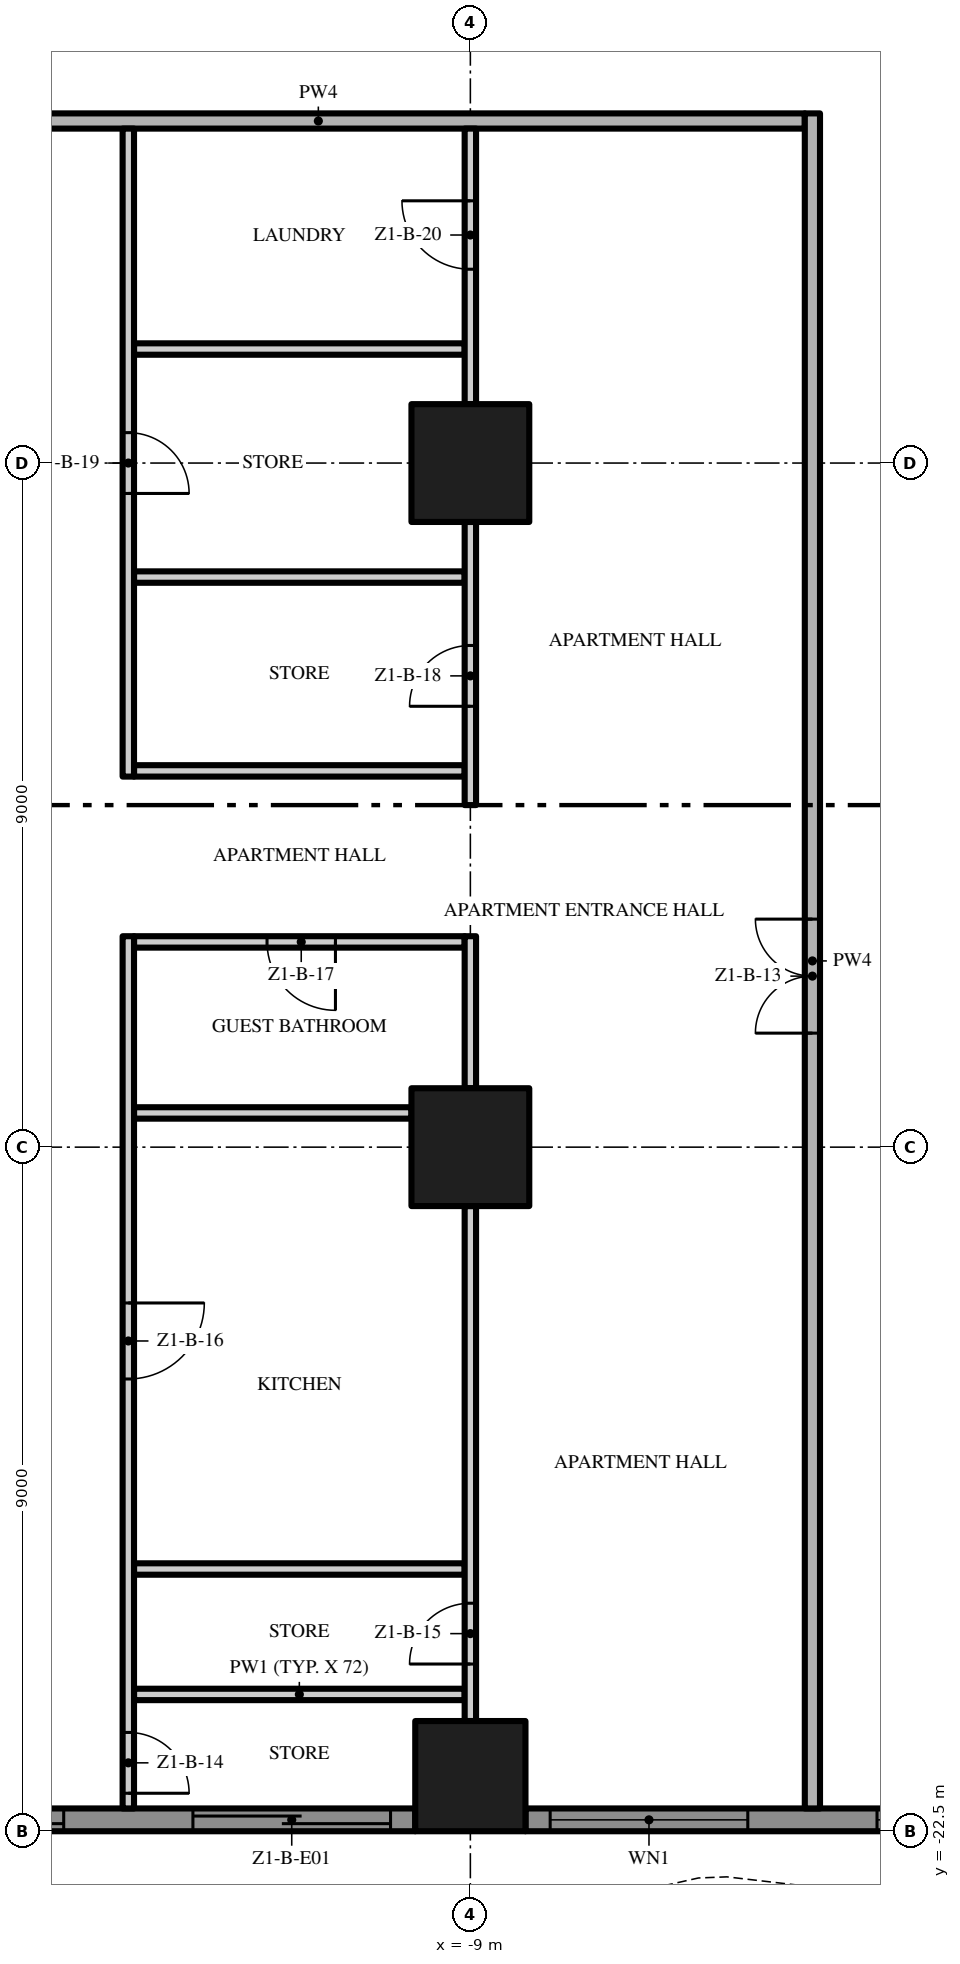
"""IFC4 building model, lengths in metres.
Left out: names, types, materials, properties, quantities, classifications, styles, units other than length and angle.
Written with IfcOpenShell. Run it as: python <this file> out.ifc"""

import sys

from ifc_helpers import new_model, si_unit, direction, frame, frame_2d, origin, origin_2d, place, context, subcontext, project, spatial, polyline, rectangle, outline, extrude, element, fill, save


model = new_model("IFC4")
c1 = context("Model", 3, precision=1e-05, world=origin(), true_north=direction((0.0, 1.0)))
c2 = subcontext(c1, "Body", "Model", "MODEL_VIEW")
j1 = project(units=[si_unit("LENGTHUNIT", "METRE"), si_unit("PLANEANGLEUNIT", "RADIAN")], contexts=[c1])
p1 = place(None, origin())
s1 = spatial("IfcSite", under=j1, at=p1, CompositionType="ELEMENT")
p2 = place(p1, origin())
s2 = spatial("IfcBuilding", under=s1, at=p2, CompositionType="ELEMENT")
p3 = place(p2, frame((0.0, 0.0, 34.0)))
s3 = spatial("IfcBuildingStorey", under=s2, at=p3, CompositionType="ELEMENT", Elevation=34.0)
p4 = place(p3, frame((-9.0, -13.5, 0.0), z_axis=(0.0, 0.0, 1.0), x_axis=(1.0, 0.0, 0.0)))
e1 = element("IfcColumn", 1, at=p4, inside=s3, PredefinedType="COLUMN", context=c2, shape_type="SweptSolid", body=[
    extrude(rectangle(XDim=1.55, YDim=1.55, at=origin_2d()), origin(), (0.0, 0.0, 1.0), 3.5),
])
p5 = place(p3, frame((-9.0, -21.775, 0.0), z_axis=(0.0, 0.0, 1.0), x_axis=(1.0, 0.0, 0.0)))
e2 = element("IfcColumn", 2, at=p5, inside=s3, PredefinedType="COLUMN", context=c2, shape_type="SweptSolid", body=[
    extrude(rectangle(XDim=1.45, YDim=1.45, at=origin_2d()), origin(), (0.0, 0.0, 1.0), 3.5),
])
p6 = place(p3, frame((-9.0, -4.5, 0.0), z_axis=(0.0, 0.0, 1.0), x_axis=(1.0, 0.0, 0.0)))
e3 = element("IfcColumn", 3, at=p6, inside=s3, PredefinedType="COLUMN", context=c2, shape_type="SweptSolid", body=[
    extrude(rectangle(XDim=1.55, YDim=1.55, at=origin_2d()), origin(), (0.0, 0.0, 1.0), 3.5),
])
p7 = place(p3, frame((-9.725, -22.35, 0.0), z_axis=(0.0, 0.0, 1.0), x_axis=(-1.0, 0.0, 0.0)))
e4 = element("IfcWall", 4, at=p7, inside=s3, PredefinedType="SOLIDWALL", context=c2, shape_type="SweptSolid", body=[
    extrude(rectangle(XDim=7.55, YDim=0.3, at=frame_2d((3.775, 0.0))), origin(), (0.0, 0.0, 1.0), 3.5),
])
p8 = place(p7, frame((4.625, 0.0, 0.0)))
e5 = element("IfcOpeningElement", 5, at=p8, cuts=e4, PredefinedType="OPENING", context=c2, shape_type="SweptSolid", body=[
    extrude(rectangle(XDim=2.6, YDim=2.4, at=frame_2d((1.3, 1.2))), frame((0.0, 0.16, 0.0), z_axis=(0.0, -1.0, 0.0), x_axis=(1.0, 0.0, 0.0)), (0.0, 0.0, 1.0), 0.32),
])
p9 = place(p7, frame((0.325, 0.0, 0.0)))
e6 = element("IfcOpeningElement", 6, at=p9, cuts=e4, PredefinedType="OPENING", context=c2, shape_type="SweptSolid", body=[
    extrude(rectangle(XDim=2.6, YDim=2.4, at=frame_2d((1.3, 1.2))), frame((0.0, 0.16, 0.0), z_axis=(0.0, -1.0, 0.0), x_axis=(1.0, 0.0, 0.0)), (0.0, 0.0, 1.0), 0.32),
])
p10 = place(p3, frame((-0.725, -22.35, 0.0), z_axis=(0.0, 0.0, 1.0), x_axis=(-1.0, 0.0, 0.0)))
e7 = element("IfcWall", 7, at=p10, inside=s3, PredefinedType="SOLIDWALL", context=c2, shape_type="SweptSolid", body=[
    extrude(rectangle(XDim=7.55, YDim=0.3, at=frame_2d((3.775, 0.0))), origin(), (0.0, 0.0, 1.0), 3.5),
])
p11 = place(p10, frame((4.625, 0.0, 0.45)))
e8 = element("IfcOpeningElement", 8, at=p11, cuts=e7, PredefinedType="OPENING", context=c2, shape_type="SweptSolid", body=[
    extrude(rectangle(XDim=2.6, YDim=2.65, at=frame_2d((1.3, 1.325))), frame((0.0, 0.16, 0.0), z_axis=(0.0, -1.0, 0.0), x_axis=(1.0, 0.0, 0.0)), (0.0, 0.0, 1.0), 0.32),
])
p12 = place(p10, frame((0.325, 0.0, 0.45)))
e9 = element("IfcOpeningElement", 9, at=p12, cuts=e7, PredefinedType="OPENING", context=c2, shape_type="SweptSolid", body=[
    extrude(rectangle(XDim=2.6, YDim=2.65, at=frame_2d((1.3, 1.325))), frame((0.0, 0.16, 0.0), z_axis=(0.0, -1.0, 0.0), x_axis=(1.0, 0.0, 0.0)), (0.0, 0.0, 1.0), 0.32),
])
p13 = place(p3, origin())
e10 = element("IfcWall", 10, at=p13, inside=s3, PredefinedType="USERDEFINED", context=c2, shape_type="SweptSolid", body=[
    extrude(outline(polyline([(-22.5, -23.451), (-21.0, -23.115), (-20.625, -23.1), (-19.5, -23.231), (-18.0, -23.755), (-16.5, -24.488), (-15.0, -25.149), (-13.5, -25.485), (-13.125, -25.5), (-12.0, -25.369), (-10.5, -24.845), (-9.0, -24.112), (-7.5, -23.451), (-6.0, -23.115), (-5.625, -23.1), (-4.5, -23.231), (-3.0, -23.755), (-1.5, -24.488), (0.0, -25.149), (1.5, -25.485), (1.875, -25.5), (3.0, -25.369), (4.5, -24.845), (6.0, -24.112), (7.5, -23.451), (9.0, -23.115), (9.375, -23.1), (10.5, -23.231), (12.0, -23.755), (13.5, -24.488), (15.0, -25.149), (16.5, -25.485), (16.875, -25.5), (18.0, -25.369), (19.5, -24.845), (21.0, -24.112), (22.5, -23.451), (22.399, -23.223), (20.895, -23.885), (19.404, -24.614), (17.944, -25.124), (16.865, -25.249), (16.533, -25.236), (15.079, -24.91), (13.605, -24.261), (12.096, -23.524), (10.556, -22.986), (9.385, -22.849), (8.967, -22.866), (7.421, -23.213), (5.895, -23.885), (4.404, -24.614), (2.944, -25.124), (1.865, -25.249), (1.533, -25.236), (0.079, -24.91), (-1.395, -24.261), (-2.904, -23.524), (-4.444, -22.986), (-5.615, -22.849), (-6.033, -22.866), (-7.579, -23.213), (-9.105, -23.885), (-10.596, -24.614), (-12.056, -25.124), (-13.135, -25.249), (-13.467, -25.236), (-14.921, -24.91), (-16.395, -24.261), (-17.904, -23.524), (-19.444, -22.986), (-20.615, -22.849), (-21.033, -22.866), (-22.555, -23.208), (-22.5, -23.451)])), origin(), (0.0, 0.0, 1.0), 0.9),
])
for number, where, z_axis, x_axis in (
    (11, (-13.425, -20.7, 0.0), (0.0, 0.0, 1.0), (1.0, 0.0, 0.0)),
    (12, (-13.425, -19.05, 0.0), (0.0, 0.0, 1.0), (1.0, 0.0, 0.0)),
):
    element("IfcWall", number, at=place(p3, frame(where, z_axis=z_axis, x_axis=x_axis)), inside=s3, PredefinedType="PARTITIONING", context=c2, shape_type="SweptSolid", body=[
        extrude(rectangle(XDim=4.35, YDim=0.15, at=frame_2d((2.175, 0.0))), origin(), (0.0, 0.0, 1.0), 3.5),
    ])
p14 = place(p3, frame((-13.425, -13.05, 0.0), z_axis=(0.0, 0.0, 1.0), x_axis=(1.0, 0.0, 0.0)))
e13 = element("IfcWall", 13, at=p14, inside=s3, PredefinedType="PARTITIONING", context=c2, shape_type="SweptSolid", body=[
    extrude(rectangle(XDim=3.65, YDim=0.15, at=frame_2d((1.825, 0.0))), origin(), (0.0, 0.0, 1.0), 3.5),
])
p15 = place(p3, frame((-9.075, -10.8, 0.0), z_axis=(0.0, 0.0, 1.0), x_axis=(-1.0, 0.0, 0.0)))
e14 = element("IfcWall", 14, at=p15, inside=s3, PredefinedType="PARTITIONING", context=c2, shape_type="SweptSolid", body=[
    extrude(rectangle(XDim=4.35, YDim=0.15, at=frame_2d((2.175, 0.0))), origin(), (0.0, 0.0, 1.0), 3.5),
])
p16 = place(p15, frame((1.7, 0.0, 0.0)))
e15 = element("IfcOpeningElement", 15, at=p16, cuts=e14, PredefinedType="OPENING", context=c2, shape_type="SweptSolid", body=[
    extrude(rectangle(XDim=0.9, YDim=2.1, at=frame_2d((0.45, 1.05))), frame((0.0, 0.085, 0.0), z_axis=(0.0, -1.0, 0.0), x_axis=(1.0, 0.0, 0.0)), (0.0, 0.0, 1.0), 0.17),
])
for number, where, z_axis, x_axis in (
    (16, (-13.425, -8.55, 0.0), (0.0, 0.0, 1.0), (1.0, 0.0, 0.0)),
    (17, (-13.425, -6.0, 0.0), (0.0, 0.0, 1.0), (1.0, 0.0, 0.0)),
    (18, (-13.425, -3.0, 0.0), (0.0, 0.0, 1.0), (1.0, 0.0, 0.0)),
):
    element("IfcWall", number, at=place(p3, frame(where, z_axis=z_axis, x_axis=x_axis)), inside=s3, PredefinedType="PARTITIONING", context=c2, shape_type="SweptSolid", body=[
        extrude(rectangle(XDim=4.35, YDim=0.15, at=frame_2d((2.175, 0.0))), origin(), (0.0, 0.0, 1.0), 3.5),
    ])
p17 = place(p3, frame((-17.4, 0.0, 0.0), z_axis=(0.0, 0.0, 1.0), x_axis=(1.0, 0.0, 0.0)))
e19 = element("IfcWall", 19, at=p17, inside=s3, PredefinedType="PARTITIONING", context=c2, shape_type="SweptSolid", body=[
    extrude(rectangle(XDim=12.8, YDim=0.2, at=frame_2d((6.4, 0.0))), origin(), (0.0, 0.0, 1.0), 3.5),
])
p18 = place(p3, frame((-13.5, -10.725, 0.0), z_axis=(0.0, 0.0, 1.0), x_axis=(0.0, -1.0, 0.0)))
e20 = element("IfcWall", 20, at=p18, inside=s3, PredefinedType="PARTITIONING", context=c2, shape_type="SweptSolid", body=[
    extrude(rectangle(XDim=11.475, YDim=0.15, at=frame_2d((5.737, 0.0))), origin(), (0.0, 0.0, 1.0), 3.5),
])
p19 = place(p18, frame((10.475, 0.0, 0.0)))
e21 = element("IfcOpeningElement", 21, at=p19, cuts=e20, PredefinedType="OPENING", context=c2, shape_type="SweptSolid", body=[
    extrude(rectangle(XDim=0.8, YDim=2.0, at=frame_2d((0.4, 1.0))), frame((0.0, 0.085, 0.0), z_axis=(0.0, -1.0, 0.0), x_axis=(1.0, 0.0, 0.0)), (0.0, 0.0, 1.0), 0.17),
])
p20 = place(p18, frame((4.825, 0.0, 0.0)))
e22 = element("IfcOpeningElement", 22, at=p20, cuts=e20, PredefinedType="OPENING", context=c2, shape_type="SweptSolid", body=[
    extrude(rectangle(XDim=1.0, YDim=2.4, at=frame_2d((0.5, 1.2))), frame((0.0, 0.085, 0.0), z_axis=(0.0, -1.0, 0.0), x_axis=(1.0, 0.0, 0.0)), (0.0, 0.0, 1.0), 0.17),
])
p21 = place(p3, frame((-13.5, -0.1, 0.0), z_axis=(0.0, 0.0, 1.0), x_axis=(0.0, -1.0, 0.0)))
e23 = element("IfcWall", 23, at=p21, inside=s3, PredefinedType="PARTITIONING", context=c2, shape_type="SweptSolid", body=[
    extrude(rectangle(XDim=8.525, YDim=0.15, at=frame_2d((4.263, 0.0))), origin(), (0.0, 0.0, 1.0), 3.5),
])
p22 = place(p21, frame((4.0, 0.0, 0.0)))
e24 = element("IfcOpeningElement", 24, at=p22, cuts=e23, PredefinedType="OPENING", context=c2, shape_type="SweptSolid", body=[
    extrude(rectangle(XDim=0.8, YDim=2.0, at=frame_2d((0.4, 1.0))), frame((0.0, 0.085, 0.0), z_axis=(0.0, -1.0, 0.0), x_axis=(1.0, 0.0, 0.0)), (0.0, 0.0, 1.0), 0.17),
])
p23 = place(p3, frame((-9.0, -21.05, 0.0), z_axis=(0.0, 0.0, 1.0), x_axis=(0.0, 1.0, 0.0)))
e25 = element("IfcWall", 25, at=p23, inside=s3, PredefinedType="PARTITIONING", context=c2, shape_type="SweptSolid", body=[
    extrude(rectangle(XDim=6.775, YDim=0.15, at=frame_2d((3.388, 0.0))), origin(), (0.0, 0.0, 1.0), 3.5),
])
p24 = place(p23, frame((0.75, 0.0, 0.0)))
e26 = element("IfcOpeningElement", 26, at=p24, cuts=e25, PredefinedType="OPENING", context=c2, shape_type="SweptSolid", body=[
    extrude(rectangle(XDim=0.8, YDim=2.0, at=frame_2d((0.4, 1.0))), frame((0.0, 0.085, 0.0), z_axis=(0.0, -1.0, 0.0), x_axis=(1.0, 0.0, 0.0)), (0.0, 0.0, 1.0), 0.17),
])
p25 = place(p3, frame((-9.0, -12.725, 0.0), z_axis=(0.0, 0.0, 1.0), x_axis=(0.0, 1.0, 0.0)))
e27 = element("IfcWall", 27, at=p25, inside=s3, PredefinedType="PARTITIONING", context=c2, shape_type="SweptSolid", body=[
    extrude(rectangle(XDim=2.0, YDim=0.15, at=frame_2d((1.0, 0.0))), origin(), (0.0, 0.0, 1.0), 3.5),
])
p26 = place(p3, frame((-9.0, -9.0, 0.0), z_axis=(0.0, 0.0, 1.0), x_axis=(0.0, 1.0, 0.0)))
e28 = element("IfcWall", 28, at=p26, inside=s3, PredefinedType="PARTITIONING", context=c2, shape_type="SweptSolid", body=[
    extrude(rectangle(XDim=3.725, YDim=0.15, at=frame_2d((1.863, 0.0))), origin(), (0.0, 0.0, 1.0), 3.5),
])
p27 = place(p26, frame((1.3, 0.0, 0.0)))
e29 = element("IfcOpeningElement", 29, at=p27, cuts=e28, PredefinedType="OPENING", context=c2, shape_type="SweptSolid", body=[
    extrude(rectangle(XDim=0.8, YDim=2.0, at=frame_2d((0.4, 1.0))), frame((0.0, 0.085, 0.0), z_axis=(0.0, -1.0, 0.0), x_axis=(1.0, 0.0, 0.0)), (0.0, 0.0, 1.0), 0.17),
])
p28 = place(p3, frame((-9.0, -3.725, 0.0), z_axis=(0.0, 0.0, 1.0), x_axis=(0.0, 1.0, 0.0)))
e30 = element("IfcWall", 30, at=p28, inside=s3, PredefinedType="PARTITIONING", context=c2, shape_type="SweptSolid", body=[
    extrude(rectangle(XDim=3.625, YDim=0.15, at=frame_2d((1.812, 0.0))), origin(), (0.0, 0.0, 1.0), 3.5),
])
p29 = place(p28, frame((1.775, 0.0, 0.0)))
e31 = element("IfcOpeningElement", 31, at=p29, cuts=e30, PredefinedType="OPENING", context=c2, shape_type="SweptSolid", body=[
    extrude(rectangle(XDim=0.9, YDim=2.1, at=frame_2d((0.45, 1.05))), frame((0.0, 0.085, 0.0), z_axis=(0.0, -1.0, 0.0), x_axis=(1.0, 0.0, 0.0)), (0.0, 0.0, 1.0), 0.17),
])
p30 = place(p3, frame((-4.5, -22.2, 0.0), z_axis=(0.0, 0.0, 1.0), x_axis=(0.0, 1.0, 0.0)))
e32 = element("IfcWall", 32, at=p30, inside=s3, PredefinedType="PARTITIONING", context=c2, shape_type="SweptSolid", body=[
    extrude(rectangle(XDim=22.3, YDim=0.2, at=frame_2d((11.15, 0.0))), origin(), (0.0, 0.0, 1.0), 3.5),
])
p31 = place(p30, frame((10.2, 0.0, 0.0)))
e33 = element("IfcOpeningElement", 33, at=p31, cuts=e32, PredefinedType="OPENING", context=c2, shape_type="SweptSolid", body=[
    extrude(rectangle(XDim=1.5, YDim=2.4, at=frame_2d((0.75, 1.2))), frame((0.0, 0.11, 0.0), z_axis=(0.0, -1.0, 0.0), x_axis=(1.0, 0.0, 0.0)), (0.0, 0.0, 1.0), 0.22),
])
p32 = place(p8, origin())
e34 = element("IfcDoor", 34, at=p32, inside=s3, OperationType="SINGLE_SWING_LEFT", PredefinedType="DOOR", context=c2, shape_type="SweptSolid", body=[
    extrude(rectangle(XDim=2.6, YDim=2.4, at=frame_2d((1.3, 1.2))), frame((0.0, 0.025, 0.0), z_axis=(0.0, -1.0, 0.0), x_axis=(1.0, 0.0, 0.0)), (0.0, 0.0, 1.0), 0.05),
])
fill(e5, e34)
p33 = place(p9, origin())
e35 = element("IfcDoor", 35, at=p33, inside=s3, OperationType="SINGLE_SWING_LEFT", PredefinedType="DOOR", context=c2, shape_type="SweptSolid", body=[
    extrude(rectangle(XDim=2.6, YDim=2.4, at=frame_2d((1.3, 1.2))), frame((0.0, 0.025, 0.0), z_axis=(0.0, -1.0, 0.0), x_axis=(1.0, 0.0, 0.0)), (0.0, 0.0, 1.0), 0.05),
])
fill(e6, e35)
p34 = place(p11, origin())
e36 = element("IfcWindow", 36, at=p34, inside=s3, PartitioningType="SINGLE_PANEL", PredefinedType="WINDOW", context=c2, shape_type="SweptSolid", body=[
    extrude(rectangle(XDim=2.6, YDim=2.65, at=frame_2d((1.3, 1.325))), frame((0.0, 0.03, 0.0), z_axis=(0.0, -1.0, 0.0), x_axis=(1.0, 0.0, 0.0)), (0.0, 0.0, 1.0), 0.06),
])
fill(e8, e36)
p35 = place(p12, origin())
e37 = element("IfcWindow", 37, at=p35, inside=s3, PartitioningType="SINGLE_PANEL", PredefinedType="WINDOW", context=c2, shape_type="SweptSolid", body=[
    extrude(rectangle(XDim=2.6, YDim=2.65, at=frame_2d((1.3, 1.325))), frame((0.0, 0.03, 0.0), z_axis=(0.0, -1.0, 0.0), x_axis=(1.0, 0.0, 0.0)), (0.0, 0.0, 1.0), 0.06),
])
fill(e9, e37)
p36 = place(p31, origin())
e38 = element("IfcDoor", 38, at=p36, inside=s3, OperationType="DOUBLE_DOOR_SINGLE_SWING", PredefinedType="DOOR", context=c2, shape_type="SweptSolid", body=[
    extrude(rectangle(XDim=1.5, YDim=2.4, at=frame_2d((0.75, 1.2))), frame((0.0, 0.025, 0.0), z_axis=(0.0, -1.0, 0.0), x_axis=(1.0, 0.0, 0.0)), (0.0, 0.0, 1.0), 0.05),
])
fill(e33, e38)
p37 = place(p19, origin())
e39 = element("IfcDoor", 39, at=p37, inside=s3, OperationType="SINGLE_SWING_RIGHT", PredefinedType="DOOR", context=c2, shape_type="SweptSolid", body=[
    extrude(rectangle(XDim=0.8, YDim=2.0, at=frame_2d((0.4, 1.0))), frame((0.0, 0.025, 0.0), z_axis=(0.0, -1.0, 0.0), x_axis=(1.0, 0.0, 0.0)), (0.0, 0.0, 1.0), 0.05),
])
fill(e21, e39)
p38 = place(p24, origin())
e40 = element("IfcDoor", 40, at=p38, inside=s3, OperationType="SINGLE_SWING_LEFT", PredefinedType="DOOR", context=c2, shape_type="SweptSolid", body=[
    extrude(rectangle(XDim=0.8, YDim=2.0, at=frame_2d((0.4, 1.0))), frame((0.0, 0.025, 0.0), z_axis=(0.0, -1.0, 0.0), x_axis=(1.0, 0.0, 0.0)), (0.0, 0.0, 1.0), 0.05),
])
fill(e26, e40)
p39 = place(p20, origin())
e41 = element("IfcDoor", 41, at=p39, inside=s3, OperationType="SINGLE_SWING_LEFT", PredefinedType="DOOR", context=c2, shape_type="SweptSolid", body=[
    extrude(rectangle(XDim=1.0, YDim=2.4, at=frame_2d((0.5, 1.2))), frame((0.0, 0.025, 0.0), z_axis=(0.0, -1.0, 0.0), x_axis=(1.0, 0.0, 0.0)), (0.0, 0.0, 1.0), 0.05),
])
fill(e22, e41)
p40 = place(p16, origin())
e42 = element("IfcDoor", 42, at=p40, inside=s3, OperationType="SINGLE_SWING_LEFT", PredefinedType="DOOR", context=c2, shape_type="SweptSolid", body=[
    extrude(rectangle(XDim=0.9, YDim=2.1, at=frame_2d((0.45, 1.05))), frame((0.0, 0.025, 0.0), z_axis=(0.0, -1.0, 0.0), x_axis=(1.0, 0.0, 0.0)), (0.0, 0.0, 1.0), 0.05),
])
fill(e15, e42)
p41 = place(p27, origin())
e43 = element("IfcDoor", 43, at=p41, inside=s3, OperationType="SINGLE_SWING_LEFT", PredefinedType="DOOR", context=c2, shape_type="SweptSolid", body=[
    extrude(rectangle(XDim=0.8, YDim=2.0, at=frame_2d((0.4, 1.0))), frame((0.0, 0.025, 0.0), z_axis=(0.0, -1.0, 0.0), x_axis=(1.0, 0.0, 0.0)), (0.0, 0.0, 1.0), 0.05),
])
fill(e29, e43)
p42 = place(p22, origin())
e44 = element("IfcDoor", 44, at=p42, inside=s3, OperationType="SINGLE_SWING_RIGHT", PredefinedType="DOOR", context=c2, shape_type="SweptSolid", body=[
    extrude(rectangle(XDim=0.8, YDim=2.0, at=frame_2d((0.4, 1.0))), frame((0.0, 0.025, 0.0), z_axis=(0.0, -1.0, 0.0), x_axis=(1.0, 0.0, 0.0)), (0.0, 0.0, 1.0), 0.05),
])
fill(e24, e44)
p43 = place(p29, origin())
e45 = element("IfcDoor", 45, at=p43, inside=s3, OperationType="SINGLE_SWING_RIGHT", PredefinedType="DOOR", context=c2, shape_type="SweptSolid", body=[
    extrude(rectangle(XDim=0.9, YDim=2.1, at=frame_2d((0.45, 1.05))), frame((0.0, 0.025, 0.0), z_axis=(0.0, -1.0, 0.0), x_axis=(1.0, 0.0, 0.0)), (0.0, 0.0, 1.0), 0.05),
])
fill(e31, e45)
save(model, sys.argv[1])
